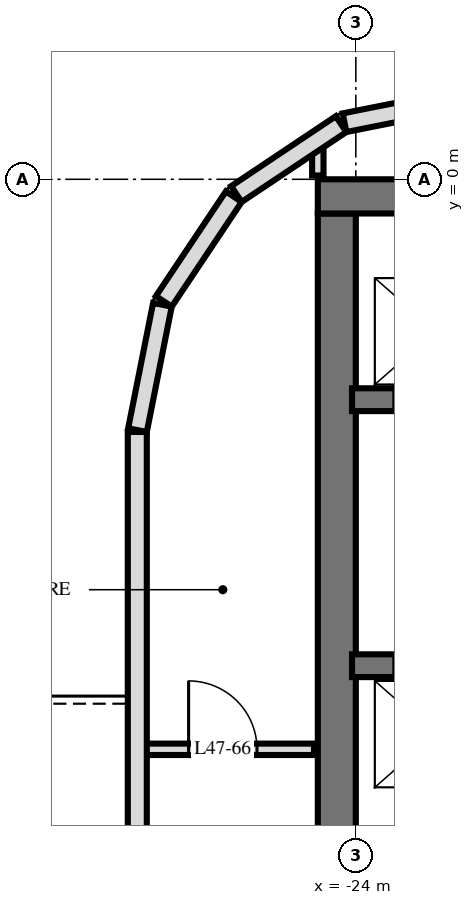
"""IFC4 building model, lengths in metres.
Left out: names, types, materials, properties, quantities, classifications, styles, units other than length and angle.
Written with IfcOpenShell. Run it as: python <this file> out.ifc"""

import sys

from ifc_helpers import new_model, si_unit, direction, frame, frame_2d, origin, place, context, subcontext, project, spatial, rectangle, extrude, element, fill, save


model = new_model("IFC4")
c1 = context("Model", 3, precision=1e-05, world=origin(), true_north=direction((0.0, 1.0)))
c2 = subcontext(c1, "Body", "Model", "MODEL_VIEW")
j1 = project(units=[si_unit("LENGTHUNIT", "METRE"), si_unit("PLANEANGLEUNIT", "RADIAN")], contexts=[c1])
p1 = place(None, origin())
s1 = spatial("IfcSite", under=j1, at=p1, CompositionType="ELEMENT")
p2 = place(p1, origin())
s2 = spatial("IfcBuilding", under=s1, at=p2, CompositionType="ELEMENT")
p3 = place(p2, frame((0.0, 0.0, 183.6)))
s3 = spatial("IfcBuildingStorey", under=s2, at=p3, CompositionType="ELEMENT", Elevation=183.6)
p4 = place(p3, frame((-24.5, -0.225, 0.0), z_axis=(0.0, 0.0, 1.0), x_axis=(1.0, 0.0, 0.0)))
e1 = element("IfcWall", 1, at=p4, inside=s3, PredefinedType="SHEAR", context=c2, shape_type="SweptSolid", body=[
    extrude(rectangle(XDim=14.5, YDim=0.45, at=frame_2d((7.25, 0.0))), origin(), (0.0, 0.0, 1.0), 3.5),
])
p5 = place(p3, frame((-24.25, -14.55, 0.0), z_axis=(0.0, 0.0, 1.0), x_axis=(0.0, 1.0, 0.0)))
e2 = element("IfcWall", 2, at=p5, inside=s3, PredefinedType="SHEAR", context=c2, shape_type="SweptSolid", body=[
    extrude(rectangle(XDim=14.1, YDim=0.5, at=frame_2d((7.05, 0.0))), origin(), (0.0, 0.0, 1.0), 3.5),
])
p6 = place(p3, frame((-24.05, -2.9, 0.0), z_axis=(0.0, 0.0, 1.0), x_axis=(1.0, 0.0, 0.0)))
e3 = element("IfcWall", 3, at=p6, inside=s3, PredefinedType="SHEAR", context=c2, shape_type="SweptSolid", body=[
    extrude(rectangle(XDim=13.7, YDim=0.3, at=frame_2d((6.85, 0.0))), origin(), (0.0, 0.0, 1.0), 3.5),
])
p7 = place(p6, frame((0.55, 0.0, 0.0)))
e4 = element("IfcOpeningElement", 4, at=p7, cuts=e3, PredefinedType="OPENING", context=c2, shape_type="SweptSolid", body=[
    extrude(rectangle(XDim=1.1, YDim=2.1, at=frame_2d((0.55, 1.05))), frame((0.0, 0.16, 0.0), z_axis=(0.0, -1.0, 0.0), x_axis=(1.0, 0.0, 0.0)), (0.0, 0.0, 1.0), 0.32),
])
p8 = place(p6, frame((5.9, 0.0, 0.0)))
e5 = element("IfcOpeningElement", 5, at=p8, cuts=e3, PredefinedType="OPENING", context=c2, shape_type="SweptSolid", body=[
    extrude(rectangle(XDim=0.9, YDim=2.1, at=frame_2d((0.45, 1.05))), frame((0.0, 0.16, 0.0), z_axis=(0.0, -1.0, 0.0), x_axis=(1.0, 0.0, 0.0)), (0.0, 0.0, 1.0), 0.32),
])
p9 = place(p6, frame((11.85, 0.0, 0.0)))
e6 = element("IfcOpeningElement", 6, at=p9, cuts=e3, PredefinedType="OPENING", context=c2, shape_type="SweptSolid", body=[
    extrude(rectangle(XDim=1.0, YDim=2.1, at=frame_2d((0.5, 1.05))), frame((0.0, 0.16, 0.0), z_axis=(0.0, -1.0, 0.0), x_axis=(1.0, 0.0, 0.0)), (0.0, 0.0, 1.0), 0.32),
])
p10 = place(p6, frame((9.312, 0.0, 0.0)))
e7 = element("IfcOpeningElement", 7, at=p10, cuts=e3, PredefinedType="OPENING", context=c2, shape_type="SweptSolid", body=[
    extrude(rectangle(XDim=1.0, YDim=2.1, at=frame_2d((0.5, 1.05))), frame((0.0, 0.16, 0.0), z_axis=(0.0, -1.0, 0.0), x_axis=(1.0, 0.0, 0.0)), (0.0, 0.0, 1.0), 0.32),
])
p11 = place(p6, frame((7.887, 0.0, 0.0)))
e8 = element("IfcOpeningElement", 8, at=p11, cuts=e3, PredefinedType="OPENING", context=c2, shape_type="SweptSolid", body=[
    extrude(rectangle(XDim=1.0, YDim=2.1, at=frame_2d((0.5, 1.05))), frame((0.0, 0.16, 0.0), z_axis=(0.0, -1.0, 0.0), x_axis=(1.0, 0.0, 0.0)), (0.0, 0.0, 1.0), 0.32),
])
p12 = place(p6, frame((3.0, 0.0, 0.0)))
e9 = element("IfcOpeningElement", 9, at=p12, cuts=e3, PredefinedType="OPENING", context=c2, shape_type="SweptSolid", body=[
    extrude(rectangle(XDim=1.0, YDim=2.1, at=frame_2d((0.5, 1.05))), frame((0.0, 0.16, 0.0), z_axis=(0.0, -1.0, 0.0), x_axis=(1.0, 0.0, 0.0)), (0.0, 0.0, 1.0), 0.32),
])
p13 = place(p3, frame((-24.05, -6.4, 0.0), z_axis=(0.0, 0.0, 1.0), x_axis=(1.0, 0.0, 0.0)))
e10 = element("IfcWall", 10, at=p13, inside=s3, PredefinedType="SHEAR", context=c2, shape_type="SweptSolid", body=[
    extrude(rectangle(XDim=13.7, YDim=0.3, at=frame_2d((6.85, 0.0))), origin(), (0.0, 0.0, 1.0), 3.5),
])
p14 = place(p13, frame((0.55, 0.0, 0.0)))
e11 = element("IfcOpeningElement", 11, at=p14, cuts=e10, PredefinedType="OPENING", context=c2, shape_type="SweptSolid", body=[
    extrude(rectangle(XDim=1.1, YDim=2.1, at=frame_2d((0.55, 1.05))), frame((0.0, 0.16, 0.0), z_axis=(0.0, -1.0, 0.0), x_axis=(1.0, 0.0, 0.0)), (0.0, 0.0, 1.0), 0.32),
])
p15 = place(p13, frame((5.8, 0.0, 0.0)))
e12 = element("IfcOpeningElement", 12, at=p15, cuts=e10, PredefinedType="OPENING", context=c2, shape_type="SweptSolid", body=[
    extrude(rectangle(XDim=1.1, YDim=2.1, at=frame_2d((0.55, 1.05))), frame((0.0, 0.16, 0.0), z_axis=(0.0, -1.0, 0.0), x_axis=(1.0, 0.0, 0.0)), (0.0, 0.0, 1.0), 0.32),
])
p16 = place(p3, frame((-22.5, 1.073, 0.0), z_axis=(0.0, 0.0, 1.0), x_axis=(-0.980803419081, -0.194999110559, 0.0)))
e13 = element("IfcWall", 13, at=p16, inside=s3, PredefinedType="SOLIDWALL", context=c2, shape_type="SweptSolid", body=[
    extrude(rectangle(XDim=1.681, YDim=0.25, at=frame_2d((0.841, 0.0))), origin(), (0.0, 0.0, 1.0), 3.22),
])
for number, where, z_axis, x_axis in (
    (14, (-24.194, 0.726, 0.0), (0.0, 0.0, 1.0), (-0.831, -0.556, 0.0)),
    (15, (-25.606, -0.229, 0.0), (0.0, 0.0, 1.0), (-0.556, -0.831, 0.0)),
):
    element("IfcWall", number, at=place(p3, frame(where, z_axis=z_axis, x_axis=x_axis)), inside=s3, PredefinedType="SOLIDWALL", context=c2, shape_type="SweptSolid", body=[
        extrude(rectangle(XDim=1.656, YDim=0.25, at=frame_2d((0.828, 0.0))), origin(), (0.0, 0.0, 1.0), 3.22),
    ])
p17 = place(p3, frame((-26.545, -1.651, 0.0), z_axis=(0.0, 0.0, 1.0), x_axis=(-0.194999110559, -0.980803419081, 0.0)))
e16 = element("IfcWall", 16, at=p17, inside=s3, PredefinedType="SOLIDWALL", context=c2, shape_type="SweptSolid", body=[
    extrude(rectangle(XDim=1.681, YDim=0.25, at=frame_2d((0.841, 0.0))), origin(), (0.0, 0.0, 1.0), 3.22),
])
p18 = place(p3, frame((-26.875, -3.325, 0.0), z_axis=(0.0, 0.0, 1.0), x_axis=(0.0, -1.0, 0.0)))
e17 = element("IfcWall", 17, at=p18, inside=s3, PredefinedType="SOLIDWALL", context=c2, shape_type="SweptSolid", body=[
    extrude(rectangle(XDim=21.551, YDim=0.25, at=frame_2d((10.775, 0.0))), origin(), (0.0, 0.0, 1.0), 3.22),
])
p19 = place(p18, frame((7.025, 0.0, 0.0)))
e18 = element("IfcOpeningElement", 18, at=p19, cuts=e17, PredefinedType="OPENING", context=c2, shape_type="SweptSolid", body=[
    extrude(rectangle(XDim=1.8, YDim=2.4, at=frame_2d((0.9, 1.2))), frame((0.0, 0.135, 0.0), z_axis=(0.0, -1.0, 0.0), x_axis=(1.0, 0.0, 0.0)), (0.0, 0.0, 1.0), 0.27),
])
p20 = place(p18, frame((14.075, 0.0, 0.0)))
e19 = element("IfcOpeningElement", 19, at=p20, cuts=e17, PredefinedType="OPENING", context=c2, shape_type="SweptSolid", body=[
    extrude(rectangle(XDim=1.8, YDim=2.4, at=frame_2d((0.9, 1.2))), frame((0.0, 0.135, 0.0), z_axis=(0.0, -1.0, 0.0), x_axis=(1.0, 0.0, 0.0)), (0.0, 0.0, 1.0), 0.27),
])
p21 = place(p18, frame((18.875, 0.0, 0.0)))
e20 = element("IfcOpeningElement", 20, at=p21, cuts=e17, PredefinedType="OPENING", context=c2, shape_type="SweptSolid", body=[
    extrude(rectangle(XDim=1.8, YDim=2.4, at=frame_2d((0.9, 1.2))), frame((0.0, 0.135, 0.0), z_axis=(0.0, -1.0, 0.0), x_axis=(1.0, 0.0, 0.0)), (0.0, 0.0, 1.0), 0.27),
])
p22 = place(p3, frame((-24.5, 0.05, 0.0), z_axis=(0.0, 0.0, 1.0), x_axis=(0.0, 1.0, 0.0)))
e21 = element("IfcWall", 21, at=p22, inside=s3, PredefinedType="PARTITIONING", context=c2, shape_type="SweptSolid", body=[
    extrude(rectangle(XDim=0.405, YDim=0.15, at=frame_2d((0.203, 0.0))), origin(), (0.0, 0.0, 1.0), 3.22),
])
p23 = place(p3, frame((-26.82, -7.5, 0.0), z_axis=(0.0, 0.0, 1.0), x_axis=(1.0, 0.0, 0.0)))
e22 = element("IfcWall", 22, at=p23, inside=s3, PredefinedType="PARTITIONING", context=c2, shape_type="SweptSolid", body=[
    extrude(rectangle(XDim=2.27, YDim=0.15, at=frame_2d((1.135, 0.0))), origin(), (0.0, 0.0, 1.0), 3.22),
])
p24 = place(p23, frame((0.62, 0.0, 0.0)))
e23 = element("IfcOpeningElement", 23, at=p24, cuts=e22, PredefinedType="OPENING", context=c2, shape_type="SweptSolid", body=[
    extrude(rectangle(XDim=0.9, YDim=2.1, at=frame_2d((0.45, 1.05))), frame((0.0, 0.085, 0.0), z_axis=(0.0, -1.0, 0.0), x_axis=(1.0, 0.0, 0.0)), (0.0, 0.0, 1.0), 0.17),
])
p25 = place(p24, origin())
e24 = element("IfcDoor", 24, at=p25, inside=s3, OperationType="SINGLE_SWING_RIGHT", PredefinedType="DOOR", context=c2, shape_type="SweptSolid", body=[
    extrude(rectangle(XDim=0.9, YDim=2.1, at=frame_2d((0.45, 1.05))), frame((0.0, 0.025, 0.0), z_axis=(0.0, -1.0, 0.0), x_axis=(1.0, 0.0, 0.0)), (0.0, 0.0, 1.0), 0.05),
])
fill(e23, e24)
save(model, sys.argv[1])
